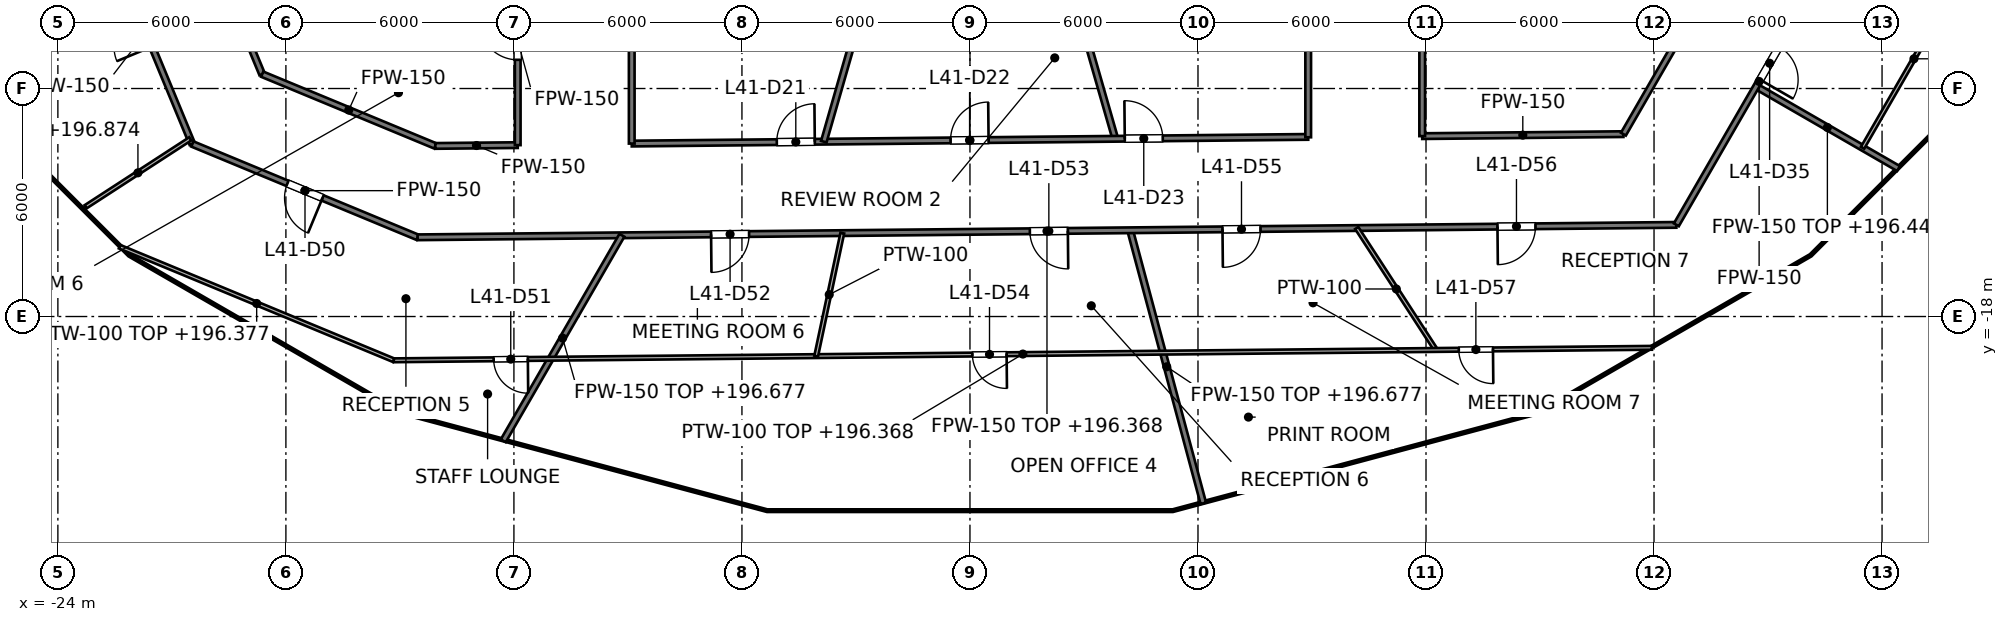
"""IFC4 building model, lengths in metres.
Left out: names, types, materials, properties, quantities, classifications, styles, units other than length and angle.
Written with IfcOpenShell. Run it as: python <this file> out.ifc"""

import sys

from ifc_helpers import new_model, si_unit, direction, frame, frame_2d, origin, place, context, subcontext, project, spatial, rectangle, extrude, element, fill, save


model = new_model("IFC4")
c1 = context("Model", 3, precision=1e-05, world=origin(), true_north=direction((0.0, 1.0)))
c2 = subcontext(c1, "Body", "Model", "MODEL_VIEW")
j1 = project(units=[si_unit("LENGTHUNIT", "METRE"), si_unit("PLANEANGLEUNIT", "RADIAN")], contexts=[c1])
p1 = place(None, origin())
s1 = spatial("IfcSite", under=j1, at=p1, CompositionType="ELEMENT")
p2 = place(p1, origin())
s2 = spatial("IfcBuilding", under=s1, at=p2, CompositionType="ELEMENT")
p3 = place(p2, frame((0.0, 0.0, 193.6)))
s3 = spatial("IfcBuildingStorey", under=s2, at=p3, CompositionType="ELEMENT", Elevation=193.6)
p4 = place(p3, frame((4.215, -15.73, 0.0), z_axis=(0.0, 0.0, 1.0), x_axis=(0.258765615768, -0.965940141052, 0.0)))
e1 = element("IfcWall", 1, at=p4, inside=s3, PredefinedType="PARTITIONING", context=c2, shape_type="SweptSolid", body=[
    extrude(rectangle(XDim=7.438, YDim=0.15, at=frame_2d((3.719, 0.0))), origin(), (0.0, 0.0, 1.0), 3.077),
])
p5 = place(p3, frame((2.296, -8.0, 0.0), z_axis=(0.0, 0.0, 1.0), x_axis=(0.275935525478, -0.961176147113, 0.0)))
e2 = element("IfcWall", 2, at=p5, inside=s3, PredefinedType="PARTITIONING", context=c2, shape_type="SweptSolid", body=[
    extrude(rectangle(XDim=5.548, YDim=0.15, at=frame_2d((2.774, 0.0))), origin(), (0.0, 0.0, 1.0), 3.7),
])
p6 = place(p3, frame((-22.9, -7.572, 0.0), z_axis=(0.0, 0.0, 1.0), x_axis=(0.382367581622, -0.924010298928, 0.0)))
e3 = element("IfcWall", 3, at=p6, inside=s3, PredefinedType="PARTITIONING", context=c2, shape_type="SweptSolid", body=[
    extrude(rectangle(XDim=6.374, YDim=0.15, at=frame_2d((3.187, 0.0))), origin(), (0.0, 0.0, 1.0), 2.777),
])
p7 = place(p6, frame((2.6, 0.0, 0.0)))
e4 = element("IfcOpeningElement", 4, at=p7, cuts=e3, PredefinedType="OPENING", context=c2, shape_type="SweptSolid", body=[
    extrude(rectangle(XDim=1.0, YDim=2.1, at=frame_2d((0.5, 1.05))), frame((0.0, 0.075, 0.0), z_axis=(0.0, -1.0, 0.0), x_axis=(1.0, 0.0, 0.0)), (0.0, 0.0, 1.0), 0.15),
])
p8 = place(p3, frame((-20.5, -7.095, 0.0), z_axis=(0.0, 0.0, 1.0), x_axis=(0.382364990163, -0.924011371303, 0.0)))
e5 = element("IfcWall", 5, at=p8, inside=s3, PredefinedType="PARTITIONING", context=c2, shape_type="SweptSolid", body=[
    extrude(rectangle(XDim=4.902, YDim=0.15, at=frame_2d((2.451, 0.0))), origin(), (0.0, 0.0, 1.0), 2.845),
])
p9 = place(p3, frame((20.69, -11.945, 0.0), z_axis=(0.0, 0.0, 1.0), x_axis=(0.866048255864, -0.499960416948, 0.0)))
e6 = element("IfcWall", 6, at=p9, inside=s3, PredefinedType="PARTITIONING", context=c2, shape_type="SweptSolid", body=[
    extrude(rectangle(XDim=4.322, YDim=0.15, at=frame_2d((2.161, 0.0))), origin(), (0.0, 0.0, 1.0), 2.845),
])
p10 = place(p3, frame((-20.46, -13.46, 0.0), z_axis=(0.0, 0.0, 1.0), x_axis=(0.923801547606, -0.382871650349, 0.0)))
e7 = element("IfcWall", 7, at=p10, inside=s3, PredefinedType="PARTITIONING", context=c2, shape_type="SweptSolid", body=[
    extrude(rectangle(XDim=6.415, YDim=0.15, at=frame_2d((3.208, 0.0))), origin(), (0.0, 0.0, 1.0), 2.777),
])
p11 = place(p10, frame((2.707, 0.0, 0.0)))
e8 = element("IfcOpeningElement", 8, at=p11, cuts=e7, PredefinedType="OPENING", context=c2, shape_type="SweptSolid", body=[
    extrude(rectangle(XDim=1.0, YDim=2.1, at=frame_2d((0.5, 1.05))), frame((0.0, 0.075, 0.0), z_axis=(0.0, -1.0, 0.0), x_axis=(1.0, 0.0, 0.0)), (0.0, 0.0, 1.0), 0.15),
])
p12 = place(p3, frame((-18.623, -11.623, 0.0), z_axis=(0.0, 0.0, 1.0), x_axis=(0.923791670587, -0.38289548098, 0.0)))
e9 = element("IfcWall", 9, at=p12, inside=s3, PredefinedType="PARTITIONING", context=c2, shape_type="SweptSolid", body=[
    extrude(rectangle(XDim=4.931, YDim=0.15, at=frame_2d((2.465, 0.0))), origin(), (0.0, 0.0, 1.0), 2.777),
])
p13 = place(p3, frame((-14.534, -15.916, 0.0), z_axis=(0.0, 0.0, 1.0), x_axis=(0.999951221888, 0.009876935033, 0.0)))
e10 = element("IfcWall", 10, at=p13, inside=s3, PredefinedType="PARTITIONING", context=c2, shape_type="SweptSolid", body=[
    extrude(rectangle(XDim=33.123, YDim=0.15, at=frame_2d((16.561, 0.0))), origin(), (0.0, 0.0, 1.0), 2.768),
])
p14 = place(p13, frame((7.722, 0.0, 0.0)))
e11 = element("IfcOpeningElement", 11, at=p14, cuts=e10, PredefinedType="OPENING", context=c2, shape_type="SweptSolid", body=[
    extrude(rectangle(XDim=1.0, YDim=2.1, at=frame_2d((0.5, 1.05))), frame((0.0, 0.075, 0.0), z_axis=(0.0, -1.0, 0.0), x_axis=(1.0, 0.0, 0.0)), (0.0, 0.0, 1.0), 0.15),
])
p15 = place(p13, frame((16.111, 0.0, 0.0)))
e12 = element("IfcOpeningElement", 12, at=p15, cuts=e10, PredefinedType="OPENING", context=c2, shape_type="SweptSolid", body=[
    extrude(rectangle(XDim=1.0, YDim=2.1, at=frame_2d((0.5, 1.05))), frame((0.0, 0.075, 0.0), z_axis=(0.0, -1.0, 0.0), x_axis=(1.0, 0.0, 0.0)), (0.0, 0.0, 1.0), 0.15),
])
p16 = place(p13, frame((21.18, 0.0, 0.0)))
e13 = element("IfcOpeningElement", 13, at=p16, cuts=e10, PredefinedType="OPENING", context=c2, shape_type="SweptSolid", body=[
    extrude(rectangle(XDim=1.0, YDim=2.1, at=frame_2d((0.5, 1.05))), frame((0.0, 0.075, 0.0), z_axis=(0.0, -1.0, 0.0), x_axis=(1.0, 0.0, 0.0)), (0.0, 0.0, 1.0), 0.15),
])
p17 = place(p13, frame((28.416, 0.0, 0.0)))
e14 = element("IfcOpeningElement", 14, at=p17, cuts=e10, PredefinedType="OPENING", context=c2, shape_type="SweptSolid", body=[
    extrude(rectangle(XDim=1.0, YDim=2.1, at=frame_2d((0.5, 1.05))), frame((0.0, 0.075, 0.0), z_axis=(0.0, -1.0, 0.0), x_axis=(1.0, 0.0, 0.0)), (0.0, 0.0, 1.0), 0.15),
])
p18 = place(p3, frame((-14.068, -13.511, 0.0), z_axis=(0.0, 0.0, 1.0), x_axis=(0.999950911515, 0.009908307647, 0.0)))
e15 = element("IfcWall", 15, at=p18, inside=s3, PredefinedType="PARTITIONING", context=c2, shape_type="SweptSolid", body=[
    extrude(rectangle(XDim=2.168, YDim=0.15, at=frame_2d((1.084, 0.0))), origin(), (0.0, 0.0, 1.0), 2.777),
])
p19 = place(p3, frame((-8.9, -13.449, 0.0), z_axis=(0.0, 0.0, 1.0), x_axis=(0.999951241216, 0.009874977968, 0.0)))
e16 = element("IfcWall", 16, at=p19, inside=s3, PredefinedType="PARTITIONING", context=c2, shape_type="SweptSolid", body=[
    extrude(rectangle(XDim=17.801, YDim=0.15, at=frame_2d((8.9, 0.0))), origin(), (0.0, 0.0, 1.0), 2.768),
])
p20 = place(p19, frame((3.817, 0.0, 0.0)))
e17 = element("IfcOpeningElement", 17, at=p20, cuts=e16, PredefinedType="OPENING", context=c2, shape_type="SweptSolid", body=[
    extrude(rectangle(XDim=1.0, YDim=2.1, at=frame_2d((0.5, 1.05))), frame((0.0, 0.075, 0.0), z_axis=(0.0, -1.0, 0.0), x_axis=(1.0, 0.0, 0.0)), (0.0, 0.0, 1.0), 0.15),
])
p21 = place(p19, frame((8.39, 0.0, 0.0)))
e18 = element("IfcOpeningElement", 18, at=p21, cuts=e16, PredefinedType="OPENING", context=c2, shape_type="SweptSolid", body=[
    extrude(rectangle(XDim=1.0, YDim=2.1, at=frame_2d((0.5, 1.05))), frame((0.0, 0.075, 0.0), z_axis=(0.0, -1.0, 0.0), x_axis=(1.0, 0.0, 0.0)), (0.0, 0.0, 1.0), 0.15),
])
p22 = place(p19, frame((12.974, 0.0, 0.0)))
e19 = element("IfcOpeningElement", 19, at=p22, cuts=e16, PredefinedType="OPENING", context=c2, shape_type="SweptSolid", body=[
    extrude(rectangle(XDim=1.0, YDim=2.1, at=frame_2d((0.5, 1.05))), frame((0.0, 0.075, 0.0), z_axis=(0.0, -1.0, 0.0), x_axis=(1.0, 0.0, 0.0)), (0.0, 0.0, 1.0), 0.15),
])
p23 = place(p3, frame((11.9, -13.253, 0.0), z_axis=(0.0, 0.0, 1.0), x_axis=(0.999951309192, 0.009868092237, 0.0)))
e20 = element("IfcWall", 20, at=p23, inside=s3, PredefinedType="PARTITIONING", context=c2, shape_type="SweptSolid", body=[
    extrude(rectangle(XDim=5.294, YDim=0.15, at=frame_2d((2.647, 0.0))), origin(), (0.0, 0.0, 1.0), 2.777),
])
p24 = place(p3, frame((18.587, -15.587, 0.0), z_axis=(0.0, 0.0, 1.0), x_axis=(0.499960140076, 0.866048415699, 0.0)))
e21 = element("IfcWall", 21, at=p24, inside=s3, PredefinedType="PARTITIONING", context=c2, shape_type="SweptSolid", body=[
    extrude(rectangle(XDim=8.714, YDim=0.15, at=frame_2d((4.357, 0.0))), origin(), (0.0, 0.0, 1.0), 2.777),
])
p25 = place(p24, frame((4.41, 0.0, 0.0)))
e22 = element("IfcOpeningElement", 22, at=p25, cuts=e21, PredefinedType="OPENING", context=c2, shape_type="SweptSolid", body=[
    extrude(rectangle(XDim=1.0, YDim=2.1, at=frame_2d((0.5, 1.05))), frame((0.0, 0.075, 0.0), z_axis=(0.0, -1.0, 0.0), x_axis=(1.0, 0.0, 0.0)), (0.0, 0.0, 1.0), 0.15),
])
p26 = place(p3, frame((17.194, -13.201, 0.0), z_axis=(0.0, 0.0, 1.0), x_axis=(0.499955744085, 0.866050953441, 0.0)))
e23 = element("IfcWall", 23, at=p26, inside=s3, PredefinedType="PARTITIONING", context=c2, shape_type="SweptSolid", body=[
    extrude(rectangle(XDim=6.673, YDim=0.15, at=frame_2d((3.337, 0.0))), origin(), (0.0, 0.0, 1.0), 2.777),
])
p27 = place(p26, frame((2.835, 0.0, 0.0)))
e24 = element("IfcOpeningElement", 24, at=p27, cuts=e23, PredefinedType="OPENING", context=c2, shape_type="SweptSolid", body=[
    extrude(rectangle(XDim=1.0, YDim=2.1, at=frame_2d((0.5, 1.05))), frame((0.0, 0.075, 0.0), z_axis=(0.0, -1.0, 0.0), x_axis=(1.0, 0.0, 0.0)), (0.0, 0.0, 1.0), 0.15),
])
p28 = place(p3, frame((-12.28, -21.27, 0.0), z_axis=(0.0, 0.0, 1.0), x_axis=(0.499966163276, 0.866044938545, 0.0)))
e25 = element("IfcWall", 25, at=p28, inside=s3, PredefinedType="PARTITIONING", context=c2, shape_type="SweptSolid", body=[
    extrude(rectangle(XDim=6.244, YDim=0.15, at=frame_2d((3.122, 0.0))), origin(), (0.0, 0.0, 1.0), 3.077),
])
p29 = place(p3, frame((-3.846, -13.399, 0.0), z_axis=(0.0, 0.0, 1.0), x_axis=(0.275914969745, 0.961182048038, 0.0)))
e26 = element("IfcWall", 26, at=p29, inside=s3, PredefinedType="PARTITIONING", context=c2, shape_type="SweptSolid", body=[
    extrude(rectangle(XDim=5.617, YDim=0.15, at=frame_2d((2.809, 0.0))), origin(), (0.0, 0.0, 1.0), 3.7),
])
p30 = place(p3, frame((11.9, -13.253, 0.0), z_axis=(0.0, 0.0, 1.0), x_axis=(0.0, 1.0, 0.0)))
e27 = element("IfcWall", 27, at=p30, inside=s3, PredefinedType="PARTITIONING", context=c2, shape_type="SweptSolid", body=[
    extrude(rectangle(XDim=5.253, YDim=0.15, at=frame_2d((2.626, 0.0))), origin(), (0.0, 0.0, 1.0), 2.777),
])
p31 = place(p3, frame((8.9, -13.283, 0.0), z_axis=(0.0, 0.0, 1.0), x_axis=(0.0, 1.0, 0.0)))
e28 = element("IfcWall", 28, at=p31, inside=s3, PredefinedType="PARTITIONING", context=c2, shape_type="SweptSolid", body=[
    extrude(rectangle(XDim=5.283, YDim=0.15, at=frame_2d((2.642, 0.0))), origin(), (0.0, 0.0, 1.0), 2.777),
])
p32 = place(p3, frame((-8.9, -13.449, 0.0), z_axis=(0.0, 0.0, 1.0), x_axis=(0.0, 1.0, 0.0)))
e29 = element("IfcWall", 29, at=p32, inside=s3, PredefinedType="PARTITIONING", context=c2, shape_type="SweptSolid", body=[
    extrude(rectangle(XDim=5.449, YDim=0.15, at=frame_2d((2.725, 0.0))), origin(), (0.0, 0.0, 1.0), 2.777),
])
p33 = place(p3, frame((-11.9, -13.49, 0.0), z_axis=(0.0, 0.0, 1.0), x_axis=(0.0, 1.0, 0.0)))
e30 = element("IfcWall", 30, at=p33, inside=s3, PredefinedType="PARTITIONING", context=c2, shape_type="SweptSolid", body=[
    extrude(rectangle(XDim=5.49, YDim=0.15, at=frame_2d((2.745, 0.0))), origin(), (0.0, 0.0, 1.0), 2.777),
])
p34 = place(p33, frame((2.245, 0.0, 0.0)))
e31 = element("IfcOpeningElement", 31, at=p34, cuts=e30, PredefinedType="OPENING", context=c2, shape_type="SweptSolid", body=[
    extrude(rectangle(XDim=1.0, YDim=2.1, at=frame_2d((0.5, 1.05))), frame((0.0, 0.075, 0.0), z_axis=(0.0, -1.0, 0.0), x_axis=(1.0, 0.0, 0.0)), (0.0, 0.0, 1.0), 0.15),
])
p35 = place(p3, frame((10.177, -15.671, 0.0), z_axis=(0.0, 0.0, 1.0), x_axis=(0.544647409198, -0.838665129628, 0.0)))
e32 = element("IfcWall", 32, at=p35, inside=s3, PredefinedType="PARTITIONING", context=c2, shape_type="SweptSolid", body=[
    extrude(rectangle(XDim=3.826, YDim=0.1, at=frame_2d((1.913, 0.0))), origin(), (0.0, 0.0, 1.0), 3.7),
])
p36 = place(p3, frame((-22.377, -16.162, 0.0), z_axis=(0.0, 0.0, 1.0), x_axis=(0.92383433172, -0.382792538505, 0.0)))
e33 = element("IfcWall", 33, at=p36, inside=s3, PredefinedType="PARTITIONING", context=c2, shape_type="SweptSolid", body=[
    extrude(rectangle(XDim=7.811, YDim=0.1, at=frame_2d((3.906, 0.0))), origin(), (0.0, 0.0, 1.0), 2.777),
])
p37 = place(p3, frame((-15.161, -19.152, 0.0), z_axis=(0.0, 0.0, 1.0), x_axis=(0.999950812999, 0.009918244889, 0.0)))
e34 = element("IfcWall", 34, at=p37, inside=s3, PredefinedType="PARTITIONING", context=c2, shape_type="SweptSolid", body=[
    extrude(rectangle(XDim=33.108, YDim=0.1, at=frame_2d((16.554, 0.0))), origin(), (0.0, 0.0, 1.0), 2.768),
])
p38 = place(p37, frame((2.628, 0.0, 0.0)))
e35 = element("IfcOpeningElement", 35, at=p38, cuts=e34, PredefinedType="OPENING", context=c2, shape_type="SweptSolid", body=[
    extrude(rectangle(XDim=0.9, YDim=2.1, at=frame_2d((0.45, 1.05))), frame((0.0, 0.05, 0.0), z_axis=(0.0, -1.0, 0.0), x_axis=(1.0, 0.0, 0.0)), (0.0, 0.0, 1.0), 0.1),
])
p39 = place(p37, frame((15.226, 0.0, 0.0)))
e36 = element("IfcOpeningElement", 36, at=p39, cuts=e34, PredefinedType="OPENING", context=c2, shape_type="SweptSolid", body=[
    extrude(rectangle(XDim=0.9, YDim=2.1, at=frame_2d((0.45, 1.05))), frame((0.0, 0.05, 0.0), z_axis=(0.0, -1.0, 0.0), x_axis=(1.0, 0.0, 0.0)), (0.0, 0.0, 1.0), 0.1),
])
p40 = place(p37, frame((28.024, 0.0, 0.0)))
e37 = element("IfcOpeningElement", 37, at=p40, cuts=e34, PredefinedType="OPENING", context=c2, shape_type="SweptSolid", body=[
    extrude(rectangle(XDim=0.9, YDim=2.1, at=frame_2d((0.45, 1.05))), frame((0.0, 0.05, 0.0), z_axis=(0.0, -1.0, 0.0), x_axis=(1.0, 0.0, 0.0)), (0.0, 0.0, 1.0), 0.1),
])
p41 = place(p3, frame((-23.271, -15.113, 0.0), z_axis=(0.0, 0.0, 1.0), x_axis=(0.83866769183, 0.544643463819, 0.0)))
e38 = element("IfcWall", 38, at=p41, inside=s3, PredefinedType="PARTITIONING", context=c2, shape_type="SweptSolid", body=[
    extrude(rectangle(XDim=3.285, YDim=0.1, at=frame_2d((1.643, 0.0))), origin(), (0.0, 0.0, 1.0), 3.273),
])
p42 = place(p3, frame((23.487, -13.56, 0.0), z_axis=(0.0, 0.0, 1.0), x_axis=(0.500066272392, 0.86598713802, 0.0)))
e39 = element("IfcWall", 39, at=p42, inside=s3, PredefinedType="PARTITIONING", context=c2, shape_type="SweptSolid", body=[
    extrude(rectangle(XDim=5.409, YDim=0.1, at=frame_2d((2.705, 0.0))), origin(), (0.0, 0.0, 1.0), 2.845),
])
p43 = place(p3, frame((-4.047, -19.042, 0.0), z_axis=(0.0, 0.0, 1.0), x_axis=(0.207961984092, 0.978136909217, 0.0)))
e40 = element("IfcWall", 40, at=p43, inside=s3, PredefinedType="PARTITIONING", context=c2, shape_type="SweptSolid", body=[
    extrude(rectangle(XDim=3.309, YDim=0.1, at=frame_2d((1.655, 0.0))), origin(), (0.0, 0.0, 1.0), 3.7),
])
p44 = place(p20, origin())
e41 = element("IfcDoor", 41, at=p44, inside=s3, OperationType="SINGLE_SWING_RIGHT", PredefinedType="DOOR", context=c2, shape_type="SweptSolid", body=[
    extrude(rectangle(XDim=1.0, YDim=2.1, at=frame_2d((0.5, 1.05))), frame((0.0, 0.025, 0.0), z_axis=(0.0, -1.0, 0.0), x_axis=(1.0, 0.0, 0.0)), (0.0, 0.0, 1.0), 0.05),
])
fill(e17, e41)
p45 = place(p21, origin())
e42 = element("IfcDoor", 42, at=p45, inside=s3, OperationType="SINGLE_SWING_RIGHT", PredefinedType="DOOR", context=c2, shape_type="SweptSolid", body=[
    extrude(rectangle(XDim=1.0, YDim=2.1, at=frame_2d((0.5, 1.05))), frame((0.0, 0.025, 0.0), z_axis=(0.0, -1.0, 0.0), x_axis=(1.0, 0.0, 0.0)), (0.0, 0.0, 1.0), 0.05),
])
fill(e18, e42)
p46 = place(p22, origin())
e43 = element("IfcDoor", 43, at=p46, inside=s3, OperationType="SINGLE_SWING_LEFT", PredefinedType="DOOR", context=c2, shape_type="SweptSolid", body=[
    extrude(rectangle(XDim=1.0, YDim=2.1, at=frame_2d((0.5, 1.05))), frame((0.0, 0.025, 0.0), z_axis=(0.0, -1.0, 0.0), x_axis=(1.0, 0.0, 0.0)), (0.0, 0.0, 1.0), 0.05),
])
fill(e19, e43)
p47 = place(p34, origin())
e44 = element("IfcDoor", 44, at=p47, inside=s3, OperationType="SINGLE_SWING_RIGHT", PredefinedType="DOOR", context=c2, shape_type="SweptSolid", body=[
    extrude(rectangle(XDim=1.0, YDim=2.1, at=frame_2d((0.5, 1.05))), frame((0.0, 0.025, 0.0), z_axis=(0.0, -1.0, 0.0), x_axis=(1.0, 0.0, 0.0)), (0.0, 0.0, 1.0), 0.05),
])
fill(e31, e44)
p48 = place(p25, origin())
e45 = element("IfcDoor", 45, at=p48, inside=s3, OperationType="SINGLE_SWING_LEFT", PredefinedType="DOOR", context=c2, shape_type="SweptSolid", body=[
    extrude(rectangle(XDim=1.0, YDim=2.1, at=frame_2d((0.5, 1.05))), frame((0.0, 0.025, 0.0), z_axis=(0.0, -1.0, 0.0), x_axis=(1.0, 0.0, 0.0)), (0.0, 0.0, 1.0), 0.05),
])
fill(e22, e45)
p49 = place(p11, origin())
e46 = element("IfcDoor", 46, at=p49, inside=s3, OperationType="SINGLE_SWING_RIGHT", PredefinedType="DOOR", context=c2, shape_type="SweptSolid", body=[
    extrude(rectangle(XDim=1.0, YDim=2.1, at=frame_2d((0.5, 1.05))), frame((0.0, 0.025, 0.0), z_axis=(0.0, -1.0, 0.0), x_axis=(1.0, 0.0, 0.0)), (0.0, 0.0, 1.0), 0.05),
])
fill(e8, e46)
p50 = place(p38, origin())
e47 = element("IfcDoor", 47, at=p50, inside=s3, OperationType="SINGLE_SWING_RIGHT", PredefinedType="DOOR", context=c2, shape_type="SweptSolid", body=[
    extrude(rectangle(XDim=0.9, YDim=2.1, at=frame_2d((0.45, 1.05))), frame((0.0, 0.025, 0.0), z_axis=(0.0, -1.0, 0.0), x_axis=(1.0, 0.0, 0.0)), (0.0, 0.0, 1.0), 0.05),
])
fill(e35, e47)
p51 = place(p14, origin())
e48 = element("IfcDoor", 48, at=p51, inside=s3, OperationType="SINGLE_SWING_LEFT", PredefinedType="DOOR", context=c2, shape_type="SweptSolid", body=[
    extrude(rectangle(XDim=1.0, YDim=2.1, at=frame_2d((0.5, 1.05))), frame((0.0, 0.025, 0.0), z_axis=(0.0, -1.0, 0.0), x_axis=(1.0, 0.0, 0.0)), (0.0, 0.0, 1.0), 0.05),
])
fill(e11, e48)
p52 = place(p15, origin())
e49 = element("IfcDoor", 49, at=p52, inside=s3, OperationType="SINGLE_SWING_RIGHT", PredefinedType="DOOR", context=c2, shape_type="SweptSolid", body=[
    extrude(rectangle(XDim=1.0, YDim=2.1, at=frame_2d((0.5, 1.05))), frame((0.0, 0.025, 0.0), z_axis=(0.0, -1.0, 0.0), x_axis=(1.0, 0.0, 0.0)), (0.0, 0.0, 1.0), 0.05),
])
fill(e12, e49)
p53 = place(p39, origin())
e50 = element("IfcDoor", 50, at=p53, inside=s3, OperationType="SINGLE_SWING_RIGHT", PredefinedType="DOOR", context=c2, shape_type="SweptSolid", body=[
    extrude(rectangle(XDim=0.9, YDim=2.1, at=frame_2d((0.45, 1.05))), frame((0.0, 0.025, 0.0), z_axis=(0.0, -1.0, 0.0), x_axis=(1.0, 0.0, 0.0)), (0.0, 0.0, 1.0), 0.05),
])
fill(e36, e50)
p54 = place(p16, origin())
e51 = element("IfcDoor", 51, at=p54, inside=s3, OperationType="SINGLE_SWING_LEFT", PredefinedType="DOOR", context=c2, shape_type="SweptSolid", body=[
    extrude(rectangle(XDim=1.0, YDim=2.1, at=frame_2d((0.5, 1.05))), frame((0.0, 0.025, 0.0), z_axis=(0.0, -1.0, 0.0), x_axis=(1.0, 0.0, 0.0)), (0.0, 0.0, 1.0), 0.05),
])
fill(e13, e51)
p55 = place(p17, origin())
e52 = element("IfcDoor", 52, at=p55, inside=s3, OperationType="SINGLE_SWING_LEFT", PredefinedType="DOOR", context=c2, shape_type="SweptSolid", body=[
    extrude(rectangle(XDim=1.0, YDim=2.1, at=frame_2d((0.5, 1.05))), frame((0.0, 0.025, 0.0), z_axis=(0.0, -1.0, 0.0), x_axis=(1.0, 0.0, 0.0)), (0.0, 0.0, 1.0), 0.05),
])
fill(e14, e52)
p56 = place(p40, origin())
e53 = element("IfcDoor", 53, at=p56, inside=s3, OperationType="SINGLE_SWING_RIGHT", PredefinedType="DOOR", context=c2, shape_type="SweptSolid", body=[
    extrude(rectangle(XDim=0.9, YDim=2.1, at=frame_2d((0.45, 1.05))), frame((0.0, 0.025, 0.0), z_axis=(0.0, -1.0, 0.0), x_axis=(1.0, 0.0, 0.0)), (0.0, 0.0, 1.0), 0.05),
])
fill(e37, e53)
save(model, sys.argv[1])
